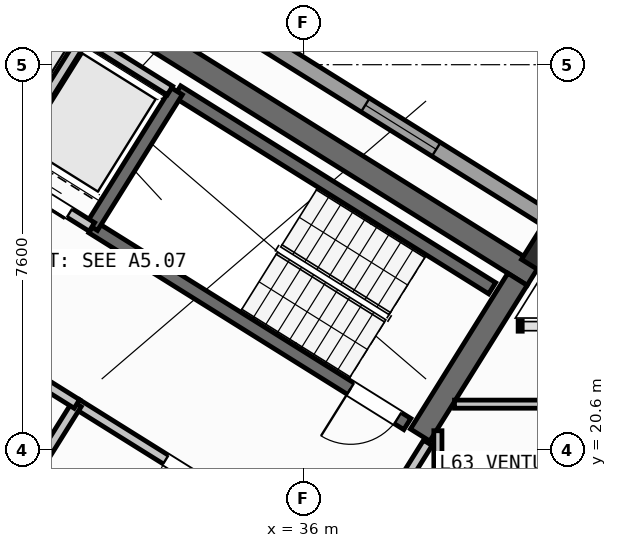
"""IFC4 building model, lengths in metres.
Left out: names, types, materials, properties, quantities, classifications, styles, units other than length and angle.
Written with IfcOpenShell. Run it as: python <this file> out.ifc"""

import sys

from ifc_helpers import new_model, si_unit, direction, frame, frame_2d, origin, origin_2d, place, context, subcontext, project, spatial, rectangle, hollow_rectangle, extrude, source, transform, mapped, element, fill, save


model = new_model("IFC4")
c1 = context("Model", 3, precision=1e-05, world=origin(), true_north=direction((0.0, 1.0)))
c2 = subcontext(c1, "Body", "Model", "MODEL_VIEW")
j1 = project(units=[si_unit("LENGTHUNIT", "METRE"), si_unit("PLANEANGLEUNIT", "RADIAN")], contexts=[c1])
p1 = place(None, origin())
s1 = spatial("IfcSite", under=j1, at=p1, CompositionType="ELEMENT")
p2 = place(p1, origin())
s2 = spatial("IfcBuilding", under=s1, at=p2, CompositionType="ELEMENT")
p3 = place(p2, frame((0.0, 0.0, 251.1)))
s3 = spatial("IfcBuildingStorey", under=s2, at=p3, CompositionType="ELEMENT", Elevation=251.1)
p4 = place(p3, frame((40.531, 24.036, 0.0), z_axis=(0.0, 0.0, 1.0), x_axis=(-0.848048787466, 0.529918157905, 0.0)))
e1 = element("IfcWall", 1, at=p4, inside=s3, PredefinedType="SHEAR", context=c2, shape_type="SweptSolid", body=[
    extrude(rectangle(XDim=13.04, YDim=0.45, at=frame_2d((6.52, 0.0))), origin(), (0.0, 0.0, 1.0), 3.32),
])
p5 = place(p3, frame((40.221, 23.965, 0.0), z_axis=(0.0, 0.0, 1.0), x_axis=(-0.529902075036, -0.848058836916, 0.0)))
e2 = element("IfcWall", 2, at=p5, inside=s3, PredefinedType="SHEAR", context=c2, shape_type="SweptSolid", body=[
    extrude(rectangle(XDim=3.625, YDim=0.45, at=frame_2d((1.812, 0.0))), origin(), (0.0, 0.0, 1.0), 3.32),
])
m1 = source(origin(), c2, "Body", "SweptSolid", [
    extrude(hollow_rectangle(XDim=0.7, YDim=0.7, WallThickness=0.028, at=origin_2d()), origin(), (0.0, 0.0, 1.0), 3.6),
])
p6 = place(p3, frame((40.783, 24.469, 0.0), z_axis=(0.0, 0.0, 1.0), x_axis=(-0.848048096156, 0.529919264233, 0.0)))
e3 = element("IfcColumn", 3, at=p6, inside=s3, PredefinedType="COLUMN", context=c2, shape_type="MappedRepresentation", body=[
    mapped(m1, transform((0.0, 0.0, 0.0), scale=1.0)),
])
p7 = place(p3, frame((14.138, 41.825, 0.0), z_axis=(0.0, 0.0, 1.0), x_axis=(0.848046498049, -0.529921821731, 0.0)))
e4 = element("IfcWall", 4, at=p7, inside=s3, PredefinedType="STANDARD", context=c2, shape_type="SweptSolid", body=[
    extrude(rectangle(XDim=31.588, YDim=0.32, at=frame_2d((15.794, 0.0))), origin(), (0.0, 0.0, 1.0), 3.32),
])
p8 = place(p7, frame((3.46, 0.0, 0.0)))
e5 = element("IfcOpeningElement", 5, at=p8, cuts=e4, PredefinedType="OPENING", context=c2, shape_type="SweptSolid", body=[
    extrude(rectangle(XDim=1.05, YDim=2.15, at=frame_2d((0.525, 1.075))), frame((0.0, 0.17, 0.0), z_axis=(0.0, -1.0, 0.0), x_axis=(1.0, 0.0, 0.0)), (0.0, 0.0, 1.0), 0.34),
])
p9 = place(p7, frame((0.831, 0.0, 1.0)))
e6 = element("IfcOpeningElement", 6, at=p9, cuts=e4, PredefinedType="OPENING", context=c2, shape_type="SweptSolid", body=[
    extrude(rectangle(XDim=0.9, YDim=1.25, at=frame_2d((0.45, 0.625))), frame((0.0, 0.17, 0.0), z_axis=(0.0, -1.0, 0.0), x_axis=(1.0, 0.0, 0.0)), (0.0, 0.0, 1.0), 0.34),
])
p10 = place(p7, frame((9.837, 0.0, 0.9)))
e7 = element("IfcOpeningElement", 7, at=p10, cuts=e4, PredefinedType="OPENING", context=c2, shape_type="SweptSolid", body=[
    extrude(rectangle(XDim=1.35, YDim=1.45, at=frame_2d((0.675, 0.725))), frame((0.0, 0.17, 0.0), z_axis=(0.0, -1.0, 0.0), x_axis=(1.0, 0.0, 0.0)), (0.0, 0.0, 1.0), 0.34),
])
p11 = place(p7, frame((13.599, 0.0, 0.95)))
e8 = element("IfcOpeningElement", 8, at=p11, cuts=e4, PredefinedType="OPENING", context=c2, shape_type="SweptSolid", body=[
    extrude(rectangle(XDim=1.95, YDim=1.35, at=frame_2d((0.975, 0.675))), frame((0.0, 0.17, 0.0), z_axis=(0.0, -1.0, 0.0), x_axis=(1.0, 0.0, 0.0)), (0.0, 0.0, 1.0), 0.34),
])
p12 = place(p7, frame((17.154, 0.0, 1.0)))
e9 = element("IfcOpeningElement", 9, at=p12, cuts=e4, PredefinedType="OPENING", context=c2, shape_type="SweptSolid", body=[
    extrude(rectangle(XDim=0.9, YDim=1.25, at=frame_2d((0.45, 0.625))), frame((0.0, 0.17, 0.0), z_axis=(0.0, -1.0, 0.0), x_axis=(1.0, 0.0, 0.0)), (0.0, 0.0, 1.0), 0.34),
])
p13 = place(p7, frame((21.651, 0.0, 0.9)))
e10 = element("IfcOpeningElement", 10, at=p13, cuts=e4, PredefinedType="OPENING", context=c2, shape_type="SweptSolid", body=[
    extrude(rectangle(XDim=1.65, YDim=1.45, at=frame_2d((0.825, 0.725))), frame((0.0, 0.17, 0.0), z_axis=(0.0, -1.0, 0.0), x_axis=(1.0, 0.0, 0.0)), (0.0, 0.0, 1.0), 0.34),
])
p14 = place(p7, frame((27.215, 0.0, 0.9)))
e11 = element("IfcOpeningElement", 11, at=p14, cuts=e4, PredefinedType="OPENING", context=c2, shape_type="SweptSolid", body=[
    extrude(rectangle(XDim=1.65, YDim=1.45, at=frame_2d((0.825, 0.725))), frame((0.0, 0.17, 0.0), z_axis=(0.0, -1.0, 0.0), x_axis=(1.0, 0.0, 0.0)), (0.0, 0.0, 1.0), 0.34),
])
p15 = place(p3, frame((31.28, 18.261, 0.0), z_axis=(0.0, 0.0, 1.0), x_axis=(-0.848051618787, 0.529913626805, 0.0)))
e12 = element("IfcWall", 12, at=p15, inside=s3, PredefinedType="SHEAR", context=c2, shape_type="SweptSolid", body=[
    extrude(rectangle(XDim=7.46, YDim=0.26, at=frame_2d((3.73, 0.0))), origin(), (0.0, 0.0, 1.0), 3.32),
])
p16 = place(p15, frame((0.36, 0.0, 0.0)))
e13 = element("IfcOpeningElement", 13, at=p16, cuts=e12, PredefinedType="OPENING", context=c2, shape_type="SweptSolid", body=[
    extrude(rectangle(XDim=0.86, YDim=2.05, at=frame_2d((0.43, 1.025))), frame((0.0, 0.14, 0.0), z_axis=(0.0, -1.0, 0.0), x_axis=(1.0, 0.0, 0.0)), (0.0, 0.0, 1.0), 0.28),
])
p17 = place(p3, frame((39.721, 23.788, 0.0), z_axis=(0.0, 0.0, 1.0), x_axis=(-0.848054434086, 0.529909121291, 0.0)))
e14 = element("IfcWall", 14, at=p17, inside=s3, PredefinedType="SHEAR", context=c2, shape_type="SweptSolid", body=[
    extrude(rectangle(XDim=7.33, YDim=0.26, at=frame_2d((3.665, 0.0))), origin(), (0.0, 0.0, 1.0), 3.32),
])
p18 = place(p3, frame((38.046, 21.108, 0.0), z_axis=(0.0, 0.0, 1.0), x_axis=(-0.848054434086, 0.529909121291, 0.0)))
e15 = element("IfcWall", 15, at=p18, inside=s3, PredefinedType="SHEAR", context=c2, shape_type="SweptSolid", body=[
    extrude(rectangle(XDim=7.33, YDim=0.26, at=frame_2d((3.665, 0.0))), origin(), (0.0, 0.0, 1.0), 3.32),
])
p19 = place(p18, frame((0.22, 0.0, 0.0)))
e16 = element("IfcOpeningElement", 16, at=p19, cuts=e15, PredefinedType="OPENING", context=c2, shape_type="SweptSolid", body=[
    extrude(rectangle(XDim=1.1, YDim=2.1, at=frame_2d((0.55, 1.05))), frame((0.0, 0.14, 0.0), z_axis=(0.0, -1.0, 0.0), x_axis=(1.0, 0.0, 0.0)), (0.0, 0.0, 1.0), 0.28),
])
p20 = place(p3, frame((33.496, 27.677, 0.0), z_axis=(0.0, 0.0, 1.0), x_axis=(-0.529908658664, -0.84805472316, 0.0)))
e17 = element("IfcWall", 17, at=p20, inside=s3, PredefinedType="SHEAR", context=c2, shape_type="SweptSolid", body=[
    extrude(rectangle(XDim=3.16, YDim=0.26, at=frame_2d((1.58, 0.0))), origin(), (0.0, 0.0, 1.0), 3.32),
])
p21 = place(p3, frame((36.459, 18.421, 0.0), z_axis=(0.0, 0.0, 1.0), x_axis=(-0.848059591691, 0.529900867089, 0.0)))
e18 = element("IfcWall", 18, at=p21, inside=s3, PredefinedType="STANDARD", context=c2, shape_type="SweptSolid", body=[
    extrude(rectangle(XDim=5.818, YDim=0.2, at=frame_2d((2.909, 0.0))), origin(), (0.0, 0.0, 1.0), 3.31),
])
p22 = place(p21, frame((2.598, 0.0, 0.0)))
e19 = element("IfcOpeningElement", 19, at=p22, cuts=e18, PredefinedType="OPENING", context=c2, shape_type="SweptSolid", body=[
    extrude(rectangle(XDim=1.15, YDim=2.1, at=frame_2d((0.575, 1.05))), frame((0.0, 0.11, 0.0), z_axis=(0.0, -1.0, 0.0), x_axis=(1.0, 0.0, 0.0)), (0.0, 0.0, 1.0), 0.22),
])
p23 = place(p3, frame((31.822, 24.998, 0.0), z_axis=(0.0, 0.0, 1.0), x_axis=(-0.848054125777, 0.529909614701, 0.0)))
e20 = element("IfcWall", 20, at=p23, inside=s3, PredefinedType="STANDARD", context=c2, shape_type="SweptSolid", body=[
    extrude(rectangle(XDim=4.668, YDim=0.2, at=frame_2d((2.334, 0.0))), origin(), (0.0, 0.0, 1.0), 3.31),
])
p24 = place(p23, frame((0.52, 0.0, 0.0)))
e21 = element("IfcOpeningElement", 21, at=p24, cuts=e20, PredefinedType="OPENING", context=c2, shape_type="SweptSolid", body=[
    extrude(rectangle(XDim=1.2, YDim=2.15, at=frame_2d((0.6, 1.075))), frame((0.0, 0.11, 0.0), z_axis=(0.0, -1.0, 0.0), x_axis=(1.0, 0.0, 0.0)), (0.0, 0.0, 1.0), 0.22),
])
p25 = place(p23, frame((2.54, 0.0, 0.0)))
e22 = element("IfcOpeningElement", 22, at=p25, cuts=e20, PredefinedType="OPENING", context=c2, shape_type="SweptSolid", body=[
    extrude(rectangle(XDim=1.2, YDim=2.15, at=frame_2d((0.6, 1.075))), frame((0.0, 0.11, 0.0), z_axis=(0.0, -1.0, 0.0), x_axis=(1.0, 0.0, 0.0)), (0.0, 0.0, 1.0), 0.22),
])
p26 = place(p3, frame((31.645, 28.716, 0.0), z_axis=(0.0, 0.0, 1.0), x_axis=(-0.52986693015, -0.848080795876, 0.0)))
e23 = element("IfcWall", 23, at=p26, inside=s3, PredefinedType="STANDARD", context=c2, shape_type="SweptSolid", body=[
    extrude(rectangle(XDim=2.66, YDim=0.2, at=frame_2d((1.33, 0.0))), origin(), (0.0, 0.0, 1.0), 3.31),
])
p27 = place(p3, frame((33.363, 27.69, 0.0), z_axis=(0.0, 0.0, 1.0), x_axis=(-0.84804957148, 0.529916903215, 0.0)))
e24 = element("IfcWall", 24, at=p27, inside=s3, PredefinedType="STANDARD", context=c2, shape_type="SweptSolid", body=[
    extrude(rectangle(XDim=4.548, YDim=0.2, at=frame_2d((2.274, 0.0))), origin(), (0.0, 0.0, 1.0), 3.31),
])
p28 = place(p3, frame((31.525, 21.504, 0.0), z_axis=(0.0, 0.0, 1.0), x_axis=(-0.529907497854, -0.848055448493, 0.0)))
e25 = element("IfcWall", 25, at=p28, inside=s3, PredefinedType="STANDARD", context=c2, shape_type="SweptSolid", body=[
    extrude(rectangle(XDim=2.88, YDim=0.2, at=frame_2d((1.44, 0.0))), origin(), (0.0, 0.0, 1.0), 3.31),
])
p29 = place(p3, frame((31.525, 21.504, 0.0), z_axis=(0.0, 0.0, 1.0), x_axis=(-0.848042066329, 0.529928913853, 0.0)))
e26 = element("IfcWall", 26, at=p29, inside=s3, PredefinedType="STANDARD", context=c2, shape_type="SweptSolid", body=[
    extrude(rectangle(XDim=6.268, YDim=0.2, at=frame_2d((3.134, 0.0))), origin(), (0.0, 0.0, 1.0), 3.31),
])
p30 = place(p29, frame((4.4, 0.0, 0.0)))
e27 = element("IfcOpeningElement", 27, at=p30, cuts=e26, PredefinedType="OPENING", context=c2, shape_type="SweptSolid", body=[
    extrude(rectangle(XDim=0.86, YDim=2.05, at=frame_2d((0.43, 1.025))), frame((0.0, 0.11, 0.0), z_axis=(0.0, -1.0, 0.0), x_axis=(1.0, 0.0, 0.0)), (0.0, 0.0, 1.0), 0.22),
])
p31 = place(p29, frame((1.45, 0.0, 0.0)))
e28 = element("IfcOpeningElement", 28, at=p31, cuts=e26, PredefinedType="OPENING", context=c2, shape_type="SweptSolid", body=[
    extrude(rectangle(XDim=0.86, YDim=2.05, at=frame_2d((0.43, 1.025))), frame((0.0, 0.11, 0.0), z_axis=(0.0, -1.0, 0.0), x_axis=(1.0, 0.0, 0.0)), (0.0, 0.0, 1.0), 0.22),
])
p32 = place(p3, frame((38.451, 20.737, 0.0), z_axis=(0.0, 0.0, 1.0), x_axis=(-0.529924799939, -0.848044637038, 0.0)))
e29 = element("IfcWall", 29, at=p32, inside=s3, PredefinedType="STANDARD", context=c2, shape_type="SweptSolid", body=[
    extrude(rectangle(XDim=2.96, YDim=0.2, at=frame_2d((1.48, 0.0))), origin(), (0.0, 0.0, 1.0), 3.31),
])
p33 = place(p32, frame((1.46, 0.0, 0.0)))
e30 = element("IfcOpeningElement", 30, at=p33, cuts=e29, PredefinedType="OPENING", context=c2, shape_type="SweptSolid", body=[
    extrude(rectangle(XDim=0.86, YDim=2.05, at=frame_2d((0.43, 1.025))), frame((0.0, 0.11, 0.0), z_axis=(0.0, -1.0, 0.0), x_axis=(1.0, 0.0, 0.0)), (0.0, 0.0, 1.0), 0.22),
])
p34 = place(p3, frame((38.65, 17.93, 0.0), z_axis=(0.0, 0.0, 1.0), x_axis=(0.0, 1.0, 0.0)))
e31 = element("IfcWall", 31, at=p34, inside=s3, PredefinedType="PARTITIONING", context=c2, shape_type="SweptSolid", body=[
    extrude(rectangle(XDim=3.046, YDim=0.16, at=frame_2d((1.523, 0.0))), origin(), (0.0, 0.0, 1.0), 3.31),
])
p35 = place(p3, frame((38.978, 21.5, 0.0), z_axis=(0.0, 0.0, 1.0), x_axis=(1.0, 0.0, 0.0)))
e32 = element("IfcWall", 32, at=p35, inside=s3, PredefinedType="PARTITIONING", context=c2, shape_type="SweptSolid", body=[
    extrude(rectangle(XDim=7.336, YDim=0.16, at=frame_2d((3.668, 0.0))), origin(), (0.0, 0.0, 1.0), 3.31),
])
m2 = source(origin(), c2, "Body", "SweptSolid", [
    extrude(rectangle(XDim=1.65, YDim=1.45, at=frame_2d((0.825, 0.725))), frame((0.0, 0.03, 0.0), z_axis=(0.0, -1.0, 0.0), x_axis=(1.0, 0.0, 0.0)), (0.0, 0.0, 1.0), 0.06),
])
p36 = place(p14, origin())
e33 = element("IfcWindow", 33, at=p36, inside=s3, PartitioningType="SINGLE_PANEL", PredefinedType="WINDOW", context=c2, shape_type="MappedRepresentation", body=[
    mapped(m2, transform((0.0, 0.0, 0.0), scale=1.0)),
])
fill(e11, e33)
m3 = source(origin(), c2, "Body", "SweptSolid", [
    extrude(rectangle(XDim=1.1, YDim=2.1, at=frame_2d((0.55, 1.05))), frame((0.0, 0.025, 0.0), z_axis=(0.0, -1.0, 0.0), x_axis=(1.0, 0.0, 0.0)), (0.0, 0.0, 1.0), 0.05),
])
p37 = place(p19, origin())
e34 = element("IfcDoor", 34, at=p37, inside=s3, OperationType="SINGLE_SWING_RIGHT", PredefinedType="DOOR", context=c2, shape_type="MappedRepresentation", body=[
    mapped(m3, transform((0.0, 0.0, 0.0), scale=1.0)),
])
fill(e16, e34)
m4 = source(origin(), c2, "Body", "SweptSolid", [
    extrude(rectangle(XDim=1.15, YDim=2.1, at=frame_2d((0.575, 1.05))), frame((0.0, 0.025, 0.0), z_axis=(0.0, -1.0, 0.0), x_axis=(1.0, 0.0, 0.0)), (0.0, 0.0, 1.0), 0.05),
])
p38 = place(p22, origin())
e35 = element("IfcDoor", 35, at=p38, inside=s3, OperationType="SINGLE_SWING_LEFT", PredefinedType="DOOR", context=c2, shape_type="MappedRepresentation", body=[
    mapped(m4, transform((0.0, 0.0, 0.0), scale=1.0)),
])
fill(e19, e35)
m5 = source(origin(), c2, "Body", "SweptSolid", [
    extrude(rectangle(XDim=1.2, YDim=2.15, at=frame_2d((0.6, 1.075))), frame((0.0, 0.025, 0.0), z_axis=(0.0, -1.0, 0.0), x_axis=(1.0, 0.0, 0.0)), (0.0, 0.0, 1.0), 0.05),
])
p39 = place(p24, origin())
e36 = element("IfcDoor", 36, at=p39, inside=s3, OperationType="DOUBLE_DOOR_SLIDING", PredefinedType="DOOR", context=c2, shape_type="MappedRepresentation", body=[
    mapped(m5, transform((0.0, 0.0, 0.0), scale=1.0)),
])
fill(e21, e36)
save(model, sys.argv[1])
